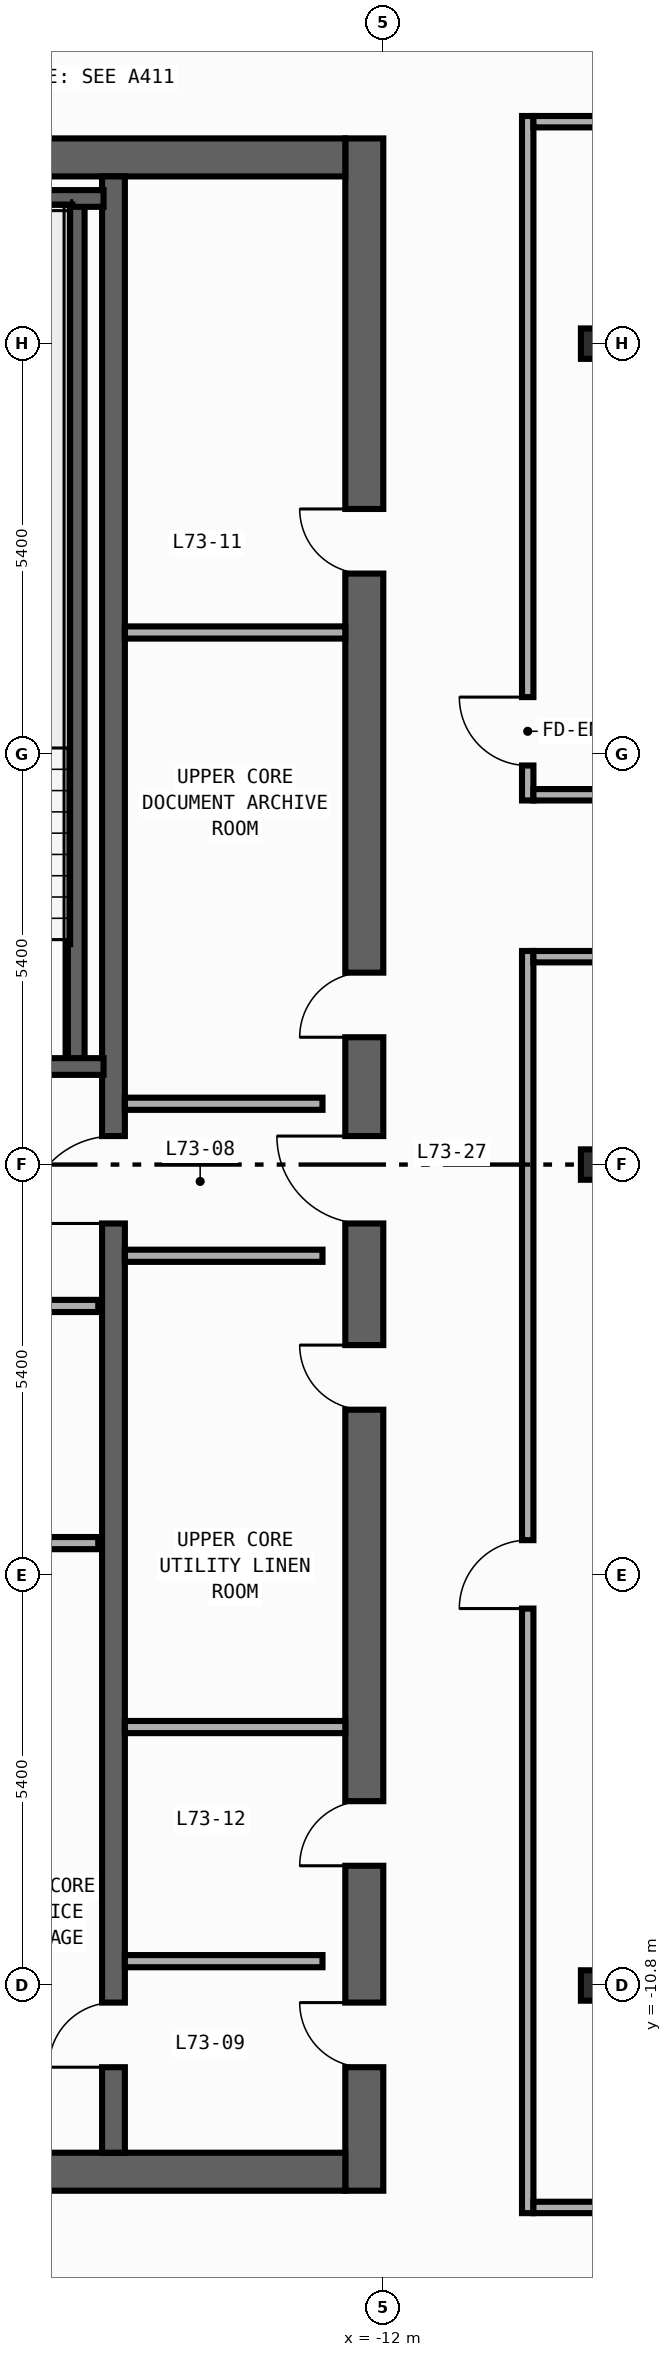
"""IFC4 building model, lengths in metres.
Left out: names, types, materials, properties, quantities, classifications, styles, units other than length and angle.
Written with IfcOpenShell. Run it as: python <this file> out.ifc"""

import sys

from ifc_helpers import new_model, si_unit, direction, frame, frame_2d, origin, origin_2d, place, context, subcontext, project, spatial, rectangle, i_section, extrude, element, fill, save


model = new_model("IFC4")
c1 = context("Model", 3, precision=1e-05, world=origin(), true_north=direction((0.0, 1.0)))
c2 = subcontext(c1, "Body", "Model", "MODEL_VIEW")
j1 = project(units=[si_unit("LENGTHUNIT", "METRE"), si_unit("PLANEANGLEUNIT", "RADIAN")], contexts=[c1])
p1 = place(None, origin())
s1 = spatial("IfcSite", under=j1, at=p1, CompositionType="ELEMENT")
p2 = place(p1, origin())
s2 = spatial("IfcBuilding", under=s1, at=p2, CompositionType="ELEMENT")
p3 = place(p2, frame((0.0, 0.0, 304.2)))
s3 = spatial("IfcBuildingStorey", under=s2, at=p3, CompositionType="ELEMENT", Elevation=304.2)
p4 = place(p3, frame((-12.25, -13.5, 0.0), z_axis=(0.0, 0.0, 1.0), x_axis=(0.0, 1.0, 0.0)))
e1 = element("IfcWall", 1, at=p4, inside=s3, PredefinedType="SHEAR", context=c2, shape_type="SweptSolid", body=[
    extrude(rectangle(XDim=27.0, YDim=0.5, at=frame_2d((13.5, 0.0))), origin(), (0.0, 0.0, 1.0), 3.54),
])
p5 = place(p4, frame((15.175, 0.0, 0.0)))
e2 = element("IfcOpeningElement", 2, at=p5, cuts=e1, PredefinedType="OPENING", context=c2, shape_type="SweptSolid", body=[
    extrude(rectangle(XDim=0.85, YDim=2.1, at=frame_2d((0.425, 1.05))), frame((0.0, 0.26, 0.0), z_axis=(0.0, -1.0, 0.0), x_axis=(1.0, 0.0, 0.0)), (0.0, 0.0, 1.0), 0.52),
])
p6 = place(p4, frame((21.275, 0.0, 0.0)))
e3 = element("IfcOpeningElement", 3, at=p6, cuts=e1, PredefinedType="OPENING", context=c2, shape_type="SweptSolid", body=[
    extrude(rectangle(XDim=0.85, YDim=2.1, at=frame_2d((0.425, 1.05))), frame((0.0, 0.26, 0.0), z_axis=(0.0, -1.0, 0.0), x_axis=(1.0, 0.0, 0.0)), (0.0, 0.0, 1.0), 0.52),
])
p7 = place(p4, frame((4.275, 0.0, 0.0)))
e4 = element("IfcOpeningElement", 4, at=p7, cuts=e1, PredefinedType="OPENING", context=c2, shape_type="SweptSolid", body=[
    extrude(rectangle(XDim=0.85, YDim=2.1, at=frame_2d((0.425, 1.05))), frame((0.0, 0.26, 0.0), z_axis=(0.0, -1.0, 0.0), x_axis=(1.0, 0.0, 0.0)), (0.0, 0.0, 1.0), 0.52),
])
p8 = place(p4, frame((10.275, 0.0, 0.0)))
e5 = element("IfcOpeningElement", 5, at=p8, cuts=e1, PredefinedType="OPENING", context=c2, shape_type="SweptSolid", body=[
    extrude(rectangle(XDim=0.85, YDim=2.1, at=frame_2d((0.425, 1.05))), frame((0.0, 0.26, 0.0), z_axis=(0.0, -1.0, 0.0), x_axis=(1.0, 0.0, 0.0)), (0.0, 0.0, 1.0), 0.52),
])
p9 = place(p4, frame((12.725, 0.0, 0.0)))
e6 = element("IfcOpeningElement", 6, at=p9, cuts=e1, PredefinedType="OPENING", context=c2, shape_type="SweptSolid", body=[
    extrude(rectangle(XDim=1.15, YDim=2.2, at=frame_2d((0.575, 1.1))), frame((0.0, 0.26, 0.0), z_axis=(0.0, -1.0, 0.0), x_axis=(1.0, 0.0, 0.0)), (0.0, 0.0, 1.0), 0.52),
])
p10 = place(p4, frame((1.625, 0.0, 0.0)))
e7 = element("IfcOpeningElement", 7, at=p10, cuts=e1, PredefinedType="OPENING", context=c2, shape_type="SweptSolid", body=[
    extrude(rectangle(XDim=0.85, YDim=2.1, at=frame_2d((0.425, 1.05))), frame((0.0, 0.26, 0.0), z_axis=(0.0, -1.0, 0.0), x_axis=(1.0, 0.0, 0.0)), (0.0, 0.0, 1.0), 0.52),
])
for number, where, z_axis, x_axis in (
    (8, (-19.9, -13.25, 0.0), (0.0, 0.0, 1.0), (1.0, 0.0, 0.0)),
    (9, (-19.9, 13.25, 0.0), (0.0, 0.0, 1.0), (1.0, 0.0, 0.0)),
):
    element("IfcWall", number, at=place(p3, frame(where, z_axis=z_axis, x_axis=x_axis)), inside=s3, PredefinedType="SHEAR", context=c2, shape_type="SweptSolid", body=[
        extrude(rectangle(XDim=7.4, YDim=0.5, at=frame_2d((3.7, 0.0))), origin(), (0.0, 0.0, 1.0), 3.54),
    ])
p11 = place(p3, frame((-15.55, -13.0, 0.0), z_axis=(0.0, 0.0, 1.0), x_axis=(0.0, 1.0, 0.0)))
e10 = element("IfcWall", 10, at=p11, inside=s3, PredefinedType="SHEAR", context=c2, shape_type="SweptSolid", body=[
    extrude(rectangle(XDim=26.0, YDim=0.3, at=frame_2d((13.0, 0.0))), origin(), (0.0, 0.0, 1.0), 3.54),
])
p12 = place(p11, frame((12.225, 0.0, 0.0)))
e11 = element("IfcOpeningElement", 11, at=p12, cuts=e10, PredefinedType="OPENING", context=c2, shape_type="SweptSolid", body=[
    extrude(rectangle(XDim=1.15, YDim=2.2, at=frame_2d((0.575, 1.1))), frame((0.0, 0.16, 0.0), z_axis=(0.0, -1.0, 0.0), x_axis=(1.0, 0.0, 0.0)), (0.0, 0.0, 1.0), 0.32),
])
p13 = place(p11, frame((1.125, 0.0, 0.0)))
e12 = element("IfcOpeningElement", 12, at=p13, cuts=e10, PredefinedType="OPENING", context=c2, shape_type="SweptSolid", body=[
    extrude(rectangle(XDim=0.85, YDim=2.1, at=frame_2d((0.425, 1.05))), frame((0.0, 0.16, 0.0), z_axis=(0.0, -1.0, 0.0), x_axis=(1.0, 0.0, 0.0)), (0.0, 0.0, 1.0), 0.32),
])
p14 = place(p3, frame((-16.04, 1.29, 0.0), z_axis=(0.0, 0.0, 1.0), x_axis=(0.0, 1.0, 0.0)))
e13 = element("IfcWall", 13, at=p14, inside=s3, PredefinedType="SHEAR", context=c2, shape_type="SweptSolid", body=[
    extrude(rectangle(XDim=11.42, YDim=0.22, at=frame_2d((5.71, 0.0))), origin(), (0.0, 0.0, 1.0), 3.54),
])
p15 = place(p3, frame((-19.92, 12.71, 0.0), z_axis=(0.0, 0.0, 1.0), x_axis=(1.0, 0.0, 0.0)))
e14 = element("IfcWall", 14, at=p15, inside=s3, PredefinedType="SHEAR", context=c2, shape_type="SweptSolid", body=[
    extrude(rectangle(XDim=4.24, YDim=0.22, at=frame_2d((2.12, 0.0))), origin(), (0.0, 0.0, 1.0), 3.54),
])
p16 = place(p3, frame((-19.92, 1.29, 0.0), z_axis=(0.0, 0.0, 1.0), x_axis=(1.0, 0.0, 0.0)))
e15 = element("IfcWall", 15, at=p16, inside=s3, PredefinedType="SHEAR", context=c2, shape_type="SweptSolid", body=[
    extrude(rectangle(XDim=4.24, YDim=0.22, at=frame_2d((2.12, 0.0))), origin(), (0.0, 0.0, 1.0), 3.54),
])
p17 = place(p16, frame((1.08, 0.0, 0.0)))
e16 = element("IfcOpeningElement", 16, at=p17, cuts=e15, PredefinedType="OPENING", context=c2, shape_type="SweptSolid", body=[
    extrude(rectangle(XDim=1.1, YDim=2.2, at=frame_2d((0.55, 1.1))), frame((0.0, 0.12, 0.0), z_axis=(0.0, -1.0, 0.0), x_axis=(1.0, 0.0, 0.0)), (0.0, 0.0, 1.0), 0.24),
])
for number, where, z_axis, x_axis in (
    (17, (-9.2, -10.8, 0.0), (0.0, 0.0, 1.0), (1.0, 0.0, 0.0)),
    (18, (-9.2, 0.0, 0.0), (0.0, 0.0, 1.0), (1.0, 0.0, 0.0)),
    (19, (-9.2, 10.8, 0.0), (0.0, 0.0, 1.0), (1.0, 0.0, 0.0)),
):
    element("IfcColumn", number, at=place(p3, frame(where, z_axis=z_axis, x_axis=x_axis)), inside=s3, PredefinedType="COLUMN", context=c2, shape_type="SweptSolid", body=[
        extrude(i_section(OverallWidth=0.4, OverallDepth=0.4, WebThickness=0.013, FlangeThickness=0.021, FilletRadius=0.022, at=origin_2d()), origin(), (0.0, 0.0, 1.0), 3.8),
    ])
p18 = place(p3, frame((-19.55, -1.86, 0.0), z_axis=(0.0, 0.0, 1.0), x_axis=(1.0, 0.0, 0.0)))
e20 = element("IfcWall", 20, at=p18, inside=s3, PredefinedType="STANDARD", context=c2, shape_type="SweptSolid", body=[
    extrude(rectangle(XDim=3.8, YDim=0.16, at=frame_2d((1.9, 0.0))), origin(), (0.0, 0.0, 1.0), 3.54),
])
p19 = place(p18, frame((1.18, 0.0, 0.0)))
e21 = element("IfcOpeningElement", 21, at=p19, cuts=e20, PredefinedType="OPENING", context=c2, shape_type="SweptSolid", body=[
    extrude(rectangle(XDim=1.15, YDim=2.2, at=frame_2d((0.575, 1.1))), frame((0.0, 0.09, 0.0), z_axis=(0.0, -1.0, 0.0), x_axis=(1.0, 0.0, 0.0)), (0.0, 0.0, 1.0), 0.18),
])
p20 = place(p3, frame((-19.55, -4.98, 0.0), z_axis=(0.0, 0.0, 1.0), x_axis=(1.0, 0.0, 0.0)))
e22 = element("IfcWall", 22, at=p20, inside=s3, PredefinedType="STANDARD", context=c2, shape_type="SweptSolid", body=[
    extrude(rectangle(XDim=3.8, YDim=0.16, at=frame_2d((1.9, 0.0))), origin(), (0.0, 0.0, 1.0), 3.54),
])
for number, where, z_axis, x_axis in (
    (23, (-15.4, 0.8, 0.0), (0.0, 0.0, 1.0), (1.0, 0.0, 0.0)),
    (24, (-15.4, -1.2, 0.0), (0.0, 0.0, 1.0), (1.0, 0.0, 0.0)),
    (25, (-15.4, -10.48, 0.0), (0.0, 0.0, 1.0), (1.0, 0.0, 0.0)),
):
    element("IfcWall", number, at=place(p3, frame(where, z_axis=z_axis, x_axis=x_axis)), inside=s3, PredefinedType="STANDARD", context=c2, shape_type="SweptSolid", body=[
        extrude(rectangle(XDim=2.6, YDim=0.16, at=frame_2d((1.3, 0.0))), origin(), (0.0, 0.0, 1.0), 3.54),
    ])
for number, where, z_axis, x_axis in (
    (26, (-15.4, 7.0, 0.0), (0.0, 0.0, 1.0), (1.0, 0.0, 0.0)),
    (27, (-15.4, -7.4, 0.0), (0.0, 0.0, 1.0), (1.0, 0.0, 0.0)),
):
    element("IfcWall", number, at=place(p3, frame(where, z_axis=z_axis, x_axis=x_axis)), inside=s3, PredefinedType="PARTITIONING", context=c2, shape_type="SweptSolid", body=[
        extrude(rectangle(XDim=2.9, YDim=0.16, at=frame_2d((1.45, 0.0))), origin(), (0.0, 0.0, 1.0), 3.54),
    ])
p21 = place(p3, frame((-10.1, 4.79, 0.0), z_axis=(0.0, 0.0, 1.0), x_axis=(0.0, 1.0, 0.0)))
e28 = element("IfcWall", 28, at=p21, inside=s3, PredefinedType="PARTITIONING", context=c2, shape_type="SweptSolid", body=[
    extrude(rectangle(XDim=9.005, YDim=0.15, at=frame_2d((4.502, 0.0))), origin(), (0.0, 0.0, 1.0), 3.54),
])
p22 = place(p21, frame((0.46, 0.0, 0.0)))
e29 = element("IfcOpeningElement", 29, at=p22, cuts=e28, PredefinedType="OPENING", context=c2, shape_type="SweptSolid", body=[
    extrude(rectangle(XDim=0.9, YDim=2.15, at=frame_2d((0.45, 1.075))), frame((0.0, 0.085, 0.0), z_axis=(0.0, -1.0, 0.0), x_axis=(1.0, 0.0, 0.0)), (0.0, 0.0, 1.0), 0.17),
])
p23 = place(p3, frame((-10.1, -13.795, 0.0), z_axis=(0.0, 0.0, 1.0), x_axis=(0.0, 1.0, 0.0)))
e30 = element("IfcWall", 30, at=p23, inside=s3, PredefinedType="PARTITIONING", context=c2, shape_type="SweptSolid", body=[
    extrude(rectangle(XDim=16.605, YDim=0.15, at=frame_2d((8.302, 0.0))), origin(), (0.0, 0.0, 1.0), 3.54),
])
p24 = place(p23, frame((7.954, 0.0, 0.0)))
e31 = element("IfcOpeningElement", 31, at=p24, cuts=e30, PredefinedType="OPENING", context=c2, shape_type="SweptSolid", body=[
    extrude(rectangle(XDim=0.9, YDim=2.15, at=frame_2d((0.45, 1.075))), frame((0.0, 0.085, 0.0), z_axis=(0.0, -1.0, 0.0), x_axis=(1.0, 0.0, 0.0)), (0.0, 0.0, 1.0), 0.17),
])
p25 = place(p3, frame((-10.025, 4.865, 0.0), z_axis=(0.0, 0.0, 1.0), x_axis=(1.0, 0.0, 0.0)))
e32 = element("IfcWall", 32, at=p25, inside=s3, PredefinedType="PARTITIONING", context=c2, shape_type="SweptSolid", body=[
    extrude(rectangle(XDim=13.055, YDim=0.15, at=frame_2d((6.527, 0.0))), origin(), (0.0, 0.0, 1.0), 3.54),
])
p26 = place(p25, frame((9.488, 0.0, 0.0)))
e33 = element("IfcOpeningElement", 33, at=p26, cuts=e32, PredefinedType="OPENING", context=c2, shape_type="SweptSolid", body=[
    extrude(rectangle(XDim=0.9, YDim=2.15, at=frame_2d((0.45, 1.075))), frame((0.0, 0.085, 0.0), z_axis=(0.0, -1.0, 0.0), x_axis=(1.0, 0.0, 0.0)), (0.0, 0.0, 1.0), 0.17),
])
p27 = place(p3, frame((-10.025, 2.735, 0.0), z_axis=(0.0, 0.0, 1.0), x_axis=(1.0, 0.0, 0.0)))
e34 = element("IfcWall", 34, at=p27, inside=s3, PredefinedType="PARTITIONING", context=c2, shape_type="SweptSolid", body=[
    extrude(rectangle(XDim=13.035, YDim=0.15, at=frame_2d((6.518, 0.0))), origin(), (0.0, 0.0, 1.0), 3.54),
])
p28 = place(p27, frame((9.672, 0.0, 0.0)))
e35 = element("IfcOpeningElement", 35, at=p28, cuts=e34, PredefinedType="OPENING", context=c2, shape_type="SweptSolid", body=[
    extrude(rectangle(XDim=0.9, YDim=2.15, at=frame_2d((0.45, 1.075))), frame((0.0, 0.085, 0.0), z_axis=(0.0, -1.0, 0.0), x_axis=(1.0, 0.0, 0.0)), (0.0, 0.0, 1.0), 0.17),
])
p29 = place(p3, frame((-10.025, 13.72, 0.0), z_axis=(0.0, 0.0, 1.0), x_axis=(1.0, 0.0, 0.0)))
e36 = element("IfcWall", 36, at=p29, inside=s3, PredefinedType="PARTITIONING", context=c2, shape_type="SweptSolid", body=[
    extrude(rectangle(XDim=13.055, YDim=0.15, at=frame_2d((6.527, 0.0))), origin(), (0.0, 0.0, 1.0), 3.54),
])
p30 = place(p29, frame((7.281, 0.0, 0.0)))
e37 = element("IfcOpeningElement", 37, at=p30, cuts=e36, PredefinedType="OPENING", context=c2, shape_type="SweptSolid", body=[
    extrude(rectangle(XDim=0.9, YDim=2.15, at=frame_2d((0.45, 1.075))), frame((0.0, 0.085, 0.0), z_axis=(0.0, -1.0, 0.0), x_axis=(1.0, 0.0, 0.0)), (0.0, 0.0, 1.0), 0.17),
])
p31 = place(p3, frame((-10.025, -13.72, 0.0), z_axis=(0.0, 0.0, 1.0), x_axis=(1.0, 0.0, 0.0)))
e38 = element("IfcWall", 38, at=p31, inside=s3, PredefinedType="PARTITIONING", context=c2, shape_type="SweptSolid", body=[
    extrude(rectangle(XDim=12.885, YDim=0.15, at=frame_2d((6.442, 0.0))), origin(), (0.0, 0.0, 1.0), 3.54),
])
p32 = place(p31, frame((7.3, 0.0, 0.0)))
e39 = element("IfcOpeningElement", 39, at=p32, cuts=e38, PredefinedType="OPENING", context=c2, shape_type="SweptSolid", body=[
    extrude(rectangle(XDim=0.9, YDim=2.15, at=frame_2d((0.45, 1.075))), frame((0.0, 0.085, 0.0), z_axis=(0.0, -1.0, 0.0), x_axis=(1.0, 0.0, 0.0)), (0.0, 0.0, 1.0), 0.17),
])
p33 = place(p5, origin())
e40 = element("IfcDoor", 40, at=p33, inside=s3, OperationType="SINGLE_SWING_LEFT", PredefinedType="DOOR", context=c2, shape_type="SweptSolid", body=[
    extrude(rectangle(XDim=0.85, YDim=2.1, at=frame_2d((0.425, 1.05))), frame((0.0, 0.025, 0.0), z_axis=(0.0, -1.0, 0.0), x_axis=(1.0, 0.0, 0.0)), (0.0, 0.0, 1.0), 0.05),
])
fill(e2, e40)
p34 = place(p6, origin())
e41 = element("IfcDoor", 41, at=p34, inside=s3, OperationType="SINGLE_SWING_RIGHT", PredefinedType="DOOR", context=c2, shape_type="SweptSolid", body=[
    extrude(rectangle(XDim=0.85, YDim=2.1, at=frame_2d((0.425, 1.05))), frame((0.0, 0.025, 0.0), z_axis=(0.0, -1.0, 0.0), x_axis=(1.0, 0.0, 0.0)), (0.0, 0.0, 1.0), 0.05),
])
fill(e3, e41)
p35 = place(p7, origin())
e42 = element("IfcDoor", 42, at=p35, inside=s3, OperationType="SINGLE_SWING_LEFT", PredefinedType="DOOR", context=c2, shape_type="SweptSolid", body=[
    extrude(rectangle(XDim=0.85, YDim=2.1, at=frame_2d((0.425, 1.05))), frame((0.0, 0.025, 0.0), z_axis=(0.0, -1.0, 0.0), x_axis=(1.0, 0.0, 0.0)), (0.0, 0.0, 1.0), 0.05),
])
fill(e4, e42)
p36 = place(p8, origin())
e43 = element("IfcDoor", 43, at=p36, inside=s3, OperationType="SINGLE_SWING_RIGHT", PredefinedType="DOOR", context=c2, shape_type="SweptSolid", body=[
    extrude(rectangle(XDim=0.85, YDim=2.1, at=frame_2d((0.425, 1.05))), frame((0.0, 0.025, 0.0), z_axis=(0.0, -1.0, 0.0), x_axis=(1.0, 0.0, 0.0)), (0.0, 0.0, 1.0), 0.05),
])
fill(e5, e43)
p37 = place(p9, origin())
e44 = element("IfcDoor", 44, at=p37, inside=s3, OperationType="SINGLE_SWING_RIGHT", PredefinedType="DOOR", context=c2, shape_type="SweptSolid", body=[
    extrude(rectangle(XDim=1.15, YDim=2.2, at=frame_2d((0.575, 1.1))), frame((0.0, 0.025, 0.0), z_axis=(0.0, -1.0, 0.0), x_axis=(1.0, 0.0, 0.0)), (0.0, 0.0, 1.0), 0.05),
])
fill(e6, e44)
p38 = place(p12, origin())
e45 = element("IfcDoor", 45, at=p38, inside=s3, OperationType="SINGLE_SWING_LEFT", PredefinedType="DOOR", context=c2, shape_type="SweptSolid", body=[
    extrude(rectangle(XDim=1.15, YDim=2.2, at=frame_2d((0.575, 1.1))), frame((0.0, 0.025, 0.0), z_axis=(0.0, -1.0, 0.0), x_axis=(1.0, 0.0, 0.0)), (0.0, 0.0, 1.0), 0.05),
])
fill(e11, e45)
p39 = place(p10, origin())
e46 = element("IfcDoor", 46, at=p39, inside=s3, OperationType="SINGLE_SWING_RIGHT", PredefinedType="DOOR", context=c2, shape_type="SweptSolid", body=[
    extrude(rectangle(XDim=0.85, YDim=2.1, at=frame_2d((0.425, 1.05))), frame((0.0, 0.025, 0.0), z_axis=(0.0, -1.0, 0.0), x_axis=(1.0, 0.0, 0.0)), (0.0, 0.0, 1.0), 0.05),
])
fill(e7, e46)
p40 = place(p13, origin())
e47 = element("IfcDoor", 47, at=p40, inside=s3, OperationType="SINGLE_SWING_LEFT", PredefinedType="DOOR", context=c2, shape_type="SweptSolid", body=[
    extrude(rectangle(XDim=0.85, YDim=2.1, at=frame_2d((0.425, 1.05))), frame((0.0, 0.025, 0.0), z_axis=(0.0, -1.0, 0.0), x_axis=(1.0, 0.0, 0.0)), (0.0, 0.0, 1.0), 0.05),
])
fill(e12, e47)
p41 = place(p22, origin())
e48 = element("IfcDoor", 48, at=p41, inside=s3, OperationType="SINGLE_SWING_RIGHT", PredefinedType="DOOR", context=c2, shape_type="SweptSolid", body=[
    extrude(rectangle(XDim=0.9, YDim=2.15, at=frame_2d((0.45, 1.075))), frame((0.0, 0.025, 0.0), z_axis=(0.0, -1.0, 0.0), x_axis=(1.0, 0.0, 0.0)), (0.0, 0.0, 1.0), 0.05),
])
fill(e29, e48)
p42 = place(p24, origin())
e49 = element("IfcDoor", 49, at=p42, inside=s3, OperationType="SINGLE_SWING_LEFT", PredefinedType="DOOR", context=c2, shape_type="SweptSolid", body=[
    extrude(rectangle(XDim=0.9, YDim=2.15, at=frame_2d((0.45, 1.075))), frame((0.0, 0.025, 0.0), z_axis=(0.0, -1.0, 0.0), x_axis=(1.0, 0.0, 0.0)), (0.0, 0.0, 1.0), 0.05),
])
fill(e31, e49)
save(model, sys.argv[1])
